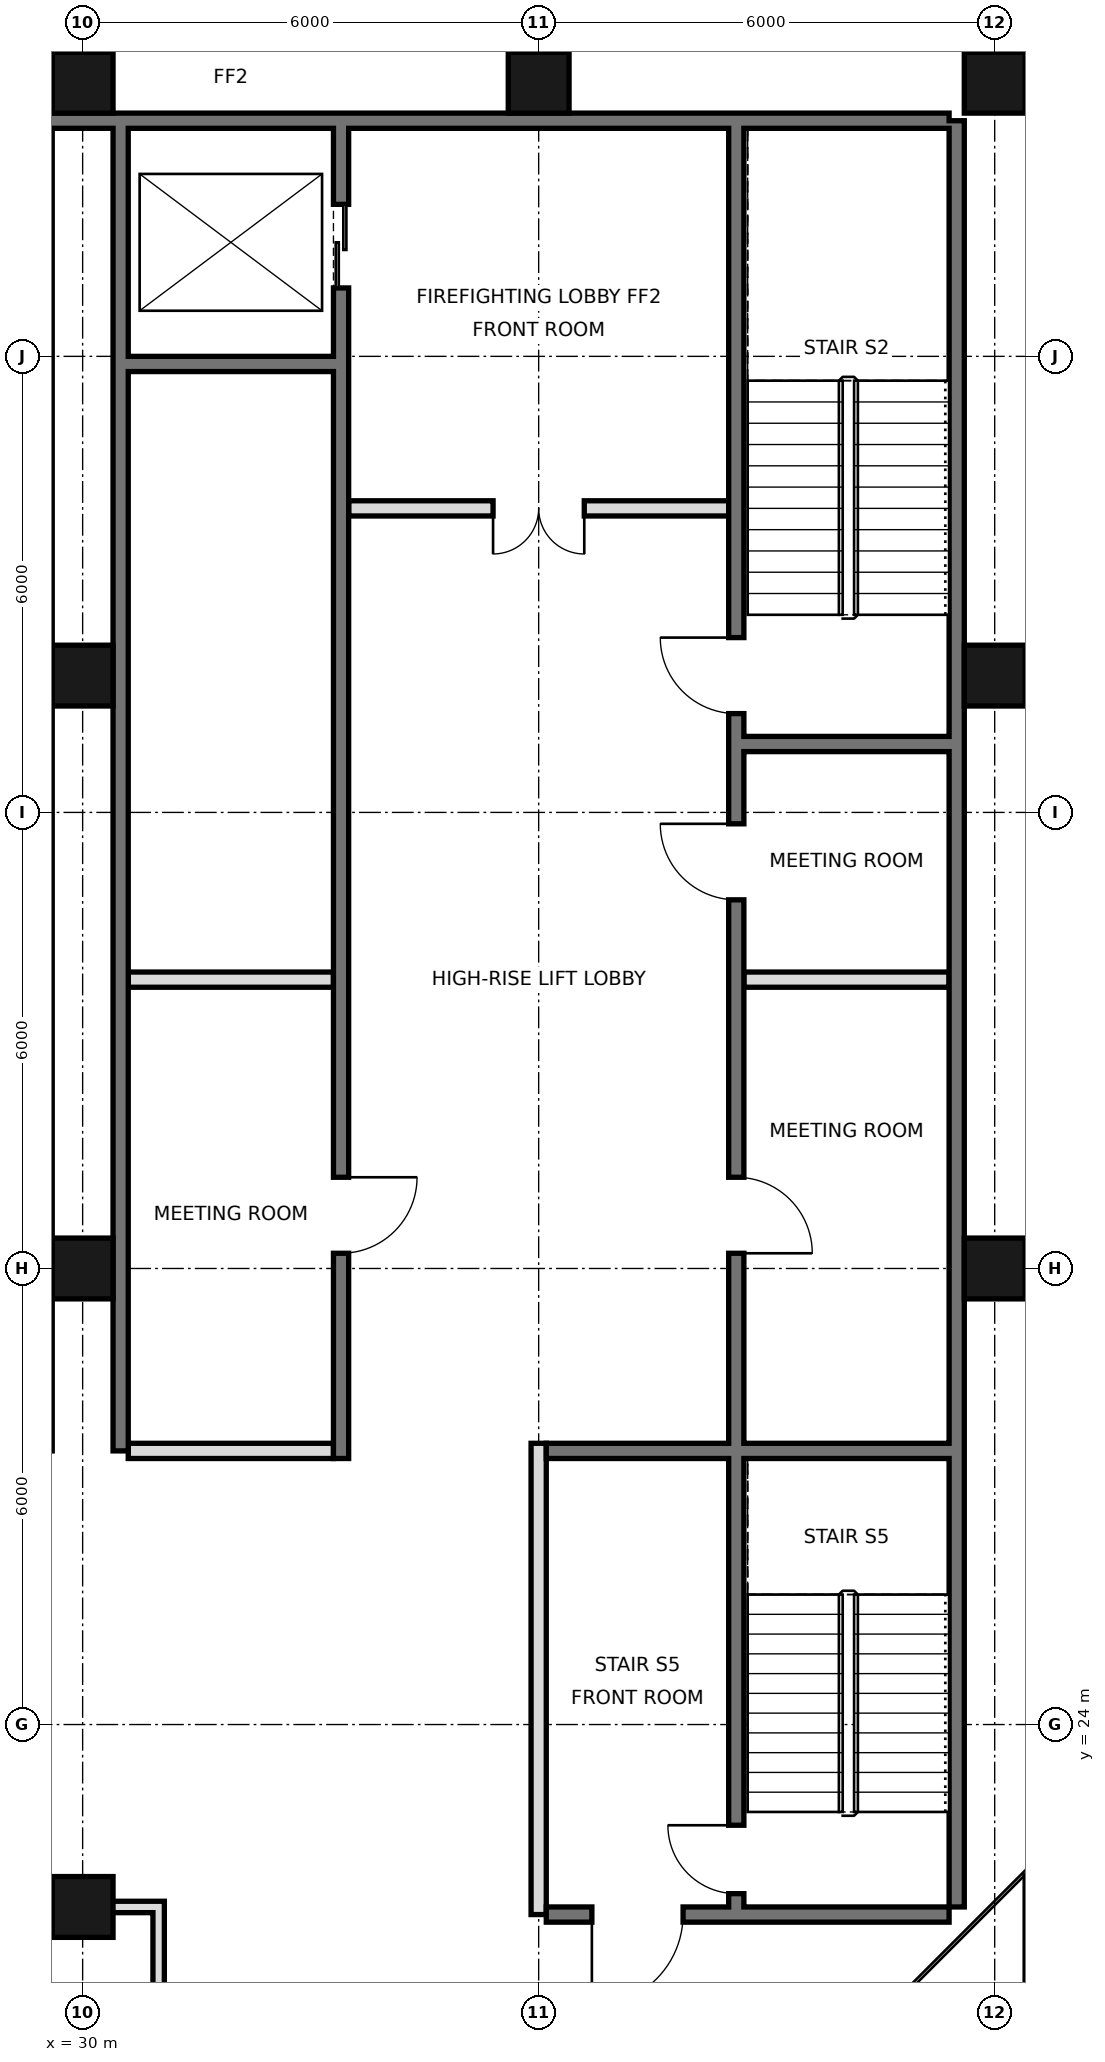
"""IFC4 building model, lengths in metres.
Left out: names, types, materials, properties, quantities, classifications, styles, units other than length and angle.
Written with IfcOpenShell. Run it as: python <this file> out.ifc"""

import sys

from ifc_helpers import new_model, si_unit, direction, frame, frame_2d, origin, origin_2d, place, context, subcontext, project, spatial, rectangle, hollow_rectangle, extrude, element, fill, save


model = new_model("IFC4")
c1 = context("Model", 3, precision=1e-05, world=origin(), true_north=direction((0.0, 1.0)))
c2 = subcontext(c1, "Body", "Model", "MODEL_VIEW")
j1 = project(units=[si_unit("LENGTHUNIT", "METRE"), si_unit("PLANEANGLEUNIT", "RADIAN")], contexts=[c1])
p1 = place(None, origin())
s1 = spatial("IfcSite", under=j1, at=p1, CompositionType="ELEMENT")
p2 = place(p1, origin())
s2 = spatial("IfcBuilding", under=s1, at=p2, CompositionType="ELEMENT")
p3 = place(p2, frame((0.0, 0.0, 345.8)))
s3 = spatial("IfcBuildingStorey", under=s2, at=p3, CompositionType="ELEMENT", Elevation=345.8)
for number, where, z_axis, x_axis in (
    (1, (30.0, 21.6, 0.0), (0.0, 0.0, 1.0), (1.0, 0.0, 0.0)),
    (2, (30.0, 30.0, 0.0), (0.0, 0.0, 1.0), (1.0, 0.0, 0.0)),
    (3, (30.0, 37.8, 0.0), (0.0, 0.0, 1.0), (1.0, 0.0, 0.0)),
    (4, (30.0, 45.6, 0.0), (0.0, 0.0, 1.0), (1.0, 0.0, 0.0)),
    (5, (36.0, 45.6, 0.0), (0.0, 0.0, 1.0), (1.0, 0.0, 0.0)),
    (6, (42.0, 30.0, 0.0), (0.0, 0.0, 1.0), (1.0, 0.0, 0.0)),
    (7, (42.0, 37.8, 0.0), (0.0, 0.0, 1.0), (1.0, 0.0, 0.0)),
    (8, (42.0, 45.6, 0.0), (0.0, 0.0, 1.0), (1.0, 0.0, 0.0)),
):
    element("IfcColumn", number, at=place(p3, frame(where, z_axis=z_axis, x_axis=x_axis)), inside=s3, PredefinedType="COLUMN", context=c2, shape_type="SweptSolid", body=[
        extrude(hollow_rectangle(XDim=0.8, YDim=0.8, WallThickness=0.025, at=origin_2d()), origin(), (0.0, 0.0, 1.0), 4.0),
    ])
p4 = place(p3, frame((31.0, 17.525, 0.0), z_axis=(0.0, 0.0, 1.0), x_axis=(0.0, 1.0, 0.0)))
e9 = element("IfcWall", 9, at=p4, inside=s3, PredefinedType="PARTITIONING", context=c2, shape_type="SweptSolid", body=[
    extrude(rectangle(XDim=4.15, YDim=0.15, at=frame_2d((2.075, 0.0))), origin(), (0.0, 0.0, 1.0), 3.75),
])
p5 = place(p3, frame((27.075, 21.6, 0.0), z_axis=(0.0, 0.0, 1.0), x_axis=(1.0, 0.0, 0.0)))
e10 = element("IfcWall", 10, at=p5, inside=s3, PredefinedType="PARTITIONING", context=c2, shape_type="SweptSolid", body=[
    extrude(rectangle(XDim=3.85, YDim=0.15, at=frame_2d((1.925, 0.0))), origin(), (0.0, 0.0, 1.0), 3.75),
])
p6 = place(p5, frame((1.425, 0.0, 0.0)))
e11 = element("IfcOpeningElement", 11, at=p6, cuts=e10, PredefinedType="OPENING", context=c2, shape_type="SweptSolid", body=[
    extrude(rectangle(XDim=1.0, YDim=2.4, at=frame_2d((0.5, 1.2))), frame((0.0, 0.085, 0.0), z_axis=(0.0, -1.0, 0.0), x_axis=(1.0, 0.0, 0.0)), (0.0, 0.0, 1.0), 0.17),
])
p7 = place(p3, frame((41.5, 21.6, 0.0), z_axis=(0.0, 0.0, 1.0), x_axis=(0.0, 1.0, 0.0)))
e12 = element("IfcWall", 12, at=p7, inside=s3, PredefinedType="SOLIDWALL", context=c2, shape_type="SweptSolid", body=[
    extrude(rectangle(XDim=23.5, YDim=0.2, at=frame_2d((11.75, 0.0))), origin(), (0.0, 0.0, 1.0), 3.75),
])
p8 = place(p3, frame((6.6, 45.1, 0.0), z_axis=(0.0, 0.0, 1.0), x_axis=(1.0, 0.0, 0.0)))
e13 = element("IfcWall", 13, at=p8, inside=s3, PredefinedType="SOLIDWALL", context=c2, shape_type="SweptSolid", body=[
    extrude(rectangle(XDim=34.8, YDim=0.2, at=frame_2d((17.4, 0.0))), origin(), (0.0, 0.0, 1.0), 3.75),
])
p9 = place(p3, frame((30.5, 27.6, 0.0), z_axis=(0.0, 0.0, 1.0), x_axis=(0.0, 1.0, 0.0)))
e14 = element("IfcWall", 14, at=p9, inside=s3, PredefinedType="SOLIDWALL", context=c2, shape_type="SweptSolid", body=[
    extrude(rectangle(XDim=17.5, YDim=0.2, at=frame_2d((8.75, 0.0))), origin(), (0.0, 0.0, 1.0), 3.75),
])
p10 = place(p3, frame((33.4, 27.5, 0.0), z_axis=(0.0, 0.0, 1.0), x_axis=(0.0, 1.0, 0.0)))
e15 = element("IfcWall", 15, at=p10, inside=s3, PredefinedType="SOLIDWALL", context=c2, shape_type="SweptSolid", body=[
    extrude(rectangle(XDim=17.5, YDim=0.2, at=frame_2d((8.75, 0.0))), origin(), (0.0, 0.0, 1.0), 3.75),
])
p11 = place(p10, frame((15.4, 0.0, 0.0)))
e16 = element("IfcOpeningElement", 16, at=p11, cuts=e15, PredefinedType="OPENING", context=c2, shape_type="SweptSolid", body=[
    extrude(rectangle(XDim=1.1, YDim=2.1, at=frame_2d((0.55, 1.05))), frame((0.0, 0.11, 0.0), z_axis=(0.0, -1.0, 0.0), x_axis=(1.0, 0.0, 0.0)), (0.0, 0.0, 1.0), 0.22),
])
p12 = place(p10, frame((2.7, 0.0, 0.0)))
e17 = element("IfcOpeningElement", 17, at=p12, cuts=e15, PredefinedType="OPENING", context=c2, shape_type="SweptSolid", body=[
    extrude(rectangle(XDim=1.0, YDim=2.1, at=frame_2d((0.5, 1.05))), frame((0.0, 0.11, 0.0), z_axis=(0.0, -1.0, 0.0), x_axis=(1.0, 0.0, 0.0)), (0.0, 0.0, 1.0), 0.22),
])
p13 = place(p3, frame((36.0, 21.5, 0.0), z_axis=(0.0, 0.0, 1.0), x_axis=(0.0, 1.0, 0.0)))
e18 = element("IfcWall", 18, at=p13, inside=s3, PredefinedType="PARTITIONING", context=c2, shape_type="SweptSolid", body=[
    extrude(rectangle(XDim=6.2, YDim=0.2, at=frame_2d((3.1, 0.0))), origin(), (0.0, 0.0, 1.0), 3.75),
])
p14 = place(p3, frame((38.6, 21.5, 0.0), z_axis=(0.0, 0.0, 1.0), x_axis=(0.0, 1.0, 0.0)))
e19 = element("IfcWall", 19, at=p14, inside=s3, PredefinedType="SOLIDWALL", context=c2, shape_type="SweptSolid", body=[
    extrude(rectangle(XDim=23.5, YDim=0.2, at=frame_2d((11.75, 0.0))), origin(), (0.0, 0.0, 1.0), 3.75),
])
p15 = place(p14, frame((8.7, 0.0, 0.0)))
e20 = element("IfcOpeningElement", 20, at=p15, cuts=e19, PredefinedType="OPENING", context=c2, shape_type="SweptSolid", body=[
    extrude(rectangle(XDim=1.0, YDim=2.1, at=frame_2d((0.5, 1.05))), frame((0.0, 0.11, 0.0), z_axis=(0.0, -1.0, 0.0), x_axis=(1.0, 0.0, 0.0)), (0.0, 0.0, 1.0), 0.22),
])
p16 = place(p14, frame((13.35, 0.0, 0.0)))
e21 = element("IfcOpeningElement", 21, at=p16, cuts=e19, PredefinedType="OPENING", context=c2, shape_type="SweptSolid", body=[
    extrude(rectangle(XDim=1.0, YDim=2.1, at=frame_2d((0.5, 1.05))), frame((0.0, 0.11, 0.0), z_axis=(0.0, -1.0, 0.0), x_axis=(1.0, 0.0, 0.0)), (0.0, 0.0, 1.0), 0.22),
])
p17 = place(p14, frame((15.8, 0.0, 0.0)))
e22 = element("IfcOpeningElement", 22, at=p17, cuts=e19, PredefinedType="OPENING", context=c2, shape_type="SweptSolid", body=[
    extrude(rectangle(XDim=1.0, YDim=2.1, at=frame_2d((0.5, 1.05))), frame((0.0, 0.11, 0.0), z_axis=(0.0, -1.0, 0.0), x_axis=(1.0, 0.0, 0.0)), (0.0, 0.0, 1.0), 0.22),
])
p18 = place(p14, frame((0.275, 0.0, 0.0)))
e23 = element("IfcOpeningElement", 23, at=p18, cuts=e19, PredefinedType="OPENING", context=c2, shape_type="SweptSolid", body=[
    extrude(rectangle(XDim=0.9, YDim=2.1, at=frame_2d((0.45, 1.05))), frame((0.0, 0.11, 0.0), z_axis=(0.0, -1.0, 0.0), x_axis=(1.0, 0.0, 0.0)), (0.0, 0.0, 1.0), 0.22),
])
p19 = place(p3, frame((36.1, 21.5, 0.0), z_axis=(0.0, 0.0, 1.0), x_axis=(1.0, 0.0, 0.0)))
e24 = element("IfcWall", 24, at=p19, inside=s3, PredefinedType="SOLIDWALL", context=c2, shape_type="SweptSolid", body=[
    extrude(rectangle(XDim=5.3, YDim=0.2, at=frame_2d((2.65, 0.0))), origin(), (0.0, 0.0, 1.0), 3.75),
])
p20 = place(p19, frame((0.6, 0.0, 0.0)))
e25 = element("IfcOpeningElement", 25, at=p20, cuts=e24, PredefinedType="OPENING", context=c2, shape_type="SweptSolid", body=[
    extrude(rectangle(XDim=1.2, YDim=2.1, at=frame_2d((0.6, 1.05))), frame((0.0, 0.11, 0.0), z_axis=(0.0, -1.0, 0.0), x_axis=(1.0, 0.0, 0.0)), (0.0, 0.0, 1.0), 0.22),
])
p21 = place(p3, frame((30.6, 27.6, 0.0), z_axis=(0.0, 0.0, 1.0), x_axis=(1.0, 0.0, 0.0)))
e26 = element("IfcWall", 26, at=p21, inside=s3, PredefinedType="PARTITIONING", context=c2, shape_type="SweptSolid", body=[
    extrude(rectangle(XDim=2.7, YDim=0.2, at=frame_2d((1.35, 0.0))), origin(), (0.0, 0.0, 1.0), 3.75),
])
p22 = place(p3, frame((36.1, 27.6, 0.0), z_axis=(0.0, 0.0, 1.0), x_axis=(1.0, 0.0, 0.0)))
e27 = element("IfcWall", 27, at=p22, inside=s3, PredefinedType="SOLIDWALL", context=c2, shape_type="SweptSolid", body=[
    extrude(rectangle(XDim=5.3, YDim=0.2, at=frame_2d((2.65, 0.0))), origin(), (0.0, 0.0, 1.0), 3.75),
])
for number, where, z_axis, x_axis in (
    (28, (30.6, 33.8, 0.0), (0.0, 0.0, 1.0), (1.0, 0.0, 0.0)),
    (29, (38.7, 33.8, 0.0), (0.0, 0.0, 1.0), (1.0, 0.0, 0.0)),
):
    element("IfcWall", number, at=place(p3, frame(where, z_axis=z_axis, x_axis=x_axis)), inside=s3, PredefinedType="PARTITIONING", context=c2, shape_type="SweptSolid", body=[
        extrude(rectangle(XDim=2.7, YDim=0.2, at=frame_2d((1.35, 0.0))), origin(), (0.0, 0.0, 1.0), 3.75),
    ])
p23 = place(p3, frame((38.7, 36.9, 0.0), z_axis=(0.0, 0.0, 1.0), x_axis=(1.0, 0.0, 0.0)))
e30 = element("IfcWall", 30, at=p23, inside=s3, PredefinedType="SOLIDWALL", context=c2, shape_type="SweptSolid", body=[
    extrude(rectangle(XDim=2.7, YDim=0.2, at=frame_2d((1.35, 0.0))), origin(), (0.0, 0.0, 1.0), 3.75),
])
p24 = place(p3, frame((33.5, 40.0, 0.0), z_axis=(0.0, 0.0, 1.0), x_axis=(1.0, 0.0, 0.0)))
e31 = element("IfcWall", 31, at=p24, inside=s3, PredefinedType="PARTITIONING", context=c2, shape_type="SweptSolid", body=[
    extrude(rectangle(XDim=5.0, YDim=0.2, at=frame_2d((2.5, 0.0))), origin(), (0.0, 0.0, 1.0), 3.75),
])
p25 = place(p24, frame((1.9, 0.0, 0.0)))
e32 = element("IfcOpeningElement", 32, at=p25, cuts=e31, PredefinedType="OPENING", context=c2, shape_type="SweptSolid", body=[
    extrude(rectangle(XDim=1.2, YDim=2.1, at=frame_2d((0.6, 1.05))), frame((0.0, 0.11, 0.0), z_axis=(0.0, -1.0, 0.0), x_axis=(1.0, 0.0, 0.0)), (0.0, 0.0, 1.0), 0.22),
])
p26 = place(p3, frame((30.6, 41.9, 0.0), z_axis=(0.0, 0.0, 1.0), x_axis=(1.0, 0.0, 0.0)))
e33 = element("IfcWall", 33, at=p26, inside=s3, PredefinedType="SOLIDWALL", context=c2, shape_type="SweptSolid", body=[
    extrude(rectangle(XDim=2.7, YDim=0.2, at=frame_2d((1.35, 0.0))), origin(), (0.0, 0.0, 1.0), 3.75),
])
p27 = place(p20, frame((1.2, 0.0, 0.0), z_axis=(0.0, 0.0, 1.0), x_axis=(-1.0, 0.0, 0.0)))
e34 = element("IfcDoor", 34, at=p27, inside=s3, OperationType="SINGLE_SWING_RIGHT", PredefinedType="DOOR", context=c2, shape_type="SweptSolid", body=[
    extrude(rectangle(XDim=1.2, YDim=2.1, at=frame_2d((0.6, 1.05))), frame((0.0, 0.025, 0.0), z_axis=(0.0, -1.0, 0.0), x_axis=(1.0, 0.0, 0.0)), (0.0, 0.0, 1.0), 0.05),
])
fill(e25, e34)
p28 = place(p25, frame((1.2, 0.0, 0.0), z_axis=(0.0, 0.0, 1.0), x_axis=(-1.0, 0.0, 0.0)))
e35 = element("IfcDoor", 35, at=p28, inside=s3, OperationType="DOUBLE_DOOR_SINGLE_SWING", PredefinedType="DOOR", context=c2, shape_type="SweptSolid", body=[
    extrude(rectangle(XDim=1.2, YDim=2.1, at=frame_2d((0.6, 1.05))), frame((0.0, 0.025, 0.0), z_axis=(0.0, -1.0, 0.0), x_axis=(1.0, 0.0, 0.0)), (0.0, 0.0, 1.0), 0.05),
])
fill(e32, e35)
p29 = place(p11, origin())
e36 = element("IfcDoor", 36, at=p29, inside=s3, OperationType="DOUBLE_DOOR_SLIDING", PredefinedType="DOOR", context=c2, shape_type="SweptSolid", body=[
    extrude(rectangle(XDim=1.1, YDim=2.1, at=frame_2d((0.55, 1.05))), frame((0.0, 0.025, 0.0), z_axis=(0.0, -1.0, 0.0), x_axis=(1.0, 0.0, 0.0)), (0.0, 0.0, 1.0), 0.05),
])
fill(e16, e36)
p30 = place(p15, frame((1.0, 0.0, 0.0), z_axis=(0.0, 0.0, 1.0), x_axis=(-1.0, 0.0, 0.0)))
e37 = element("IfcDoor", 37, at=p30, inside=s3, OperationType="SINGLE_SWING_RIGHT", PredefinedType="DOOR", context=c2, shape_type="SweptSolid", body=[
    extrude(rectangle(XDim=1.0, YDim=2.1, at=frame_2d((0.5, 1.05))), frame((0.0, 0.025, 0.0), z_axis=(0.0, -1.0, 0.0), x_axis=(1.0, 0.0, 0.0)), (0.0, 0.0, 1.0), 0.05),
])
fill(e20, e37)
p31 = place(p16, frame((1.0, 0.0, 0.0), z_axis=(0.0, 0.0, 1.0), x_axis=(-1.0, 0.0, 0.0)))
e38 = element("IfcDoor", 38, at=p31, inside=s3, OperationType="SINGLE_SWING_LEFT", PredefinedType="DOOR", context=c2, shape_type="SweptSolid", body=[
    extrude(rectangle(XDim=1.0, YDim=2.1, at=frame_2d((0.5, 1.05))), frame((0.0, 0.025, 0.0), z_axis=(0.0, -1.0, 0.0), x_axis=(1.0, 0.0, 0.0)), (0.0, 0.0, 1.0), 0.05),
])
fill(e21, e38)
p32 = place(p12, origin())
e39 = element("IfcDoor", 39, at=p32, inside=s3, OperationType="SINGLE_SWING_RIGHT", PredefinedType="DOOR", context=c2, shape_type="SweptSolid", body=[
    extrude(rectangle(XDim=1.0, YDim=2.1, at=frame_2d((0.5, 1.05))), frame((0.0, 0.025, 0.0), z_axis=(0.0, -1.0, 0.0), x_axis=(1.0, 0.0, 0.0)), (0.0, 0.0, 1.0), 0.05),
])
fill(e17, e39)
p33 = place(p17, frame((1.0, 0.0, 0.0), z_axis=(0.0, 0.0, 1.0), x_axis=(-1.0, 0.0, 0.0)))
e40 = element("IfcDoor", 40, at=p33, inside=s3, OperationType="SINGLE_SWING_LEFT", PredefinedType="DOOR", context=c2, shape_type="SweptSolid", body=[
    extrude(rectangle(XDim=1.0, YDim=2.1, at=frame_2d((0.5, 1.05))), frame((0.0, 0.025, 0.0), z_axis=(0.0, -1.0, 0.0), x_axis=(1.0, 0.0, 0.0)), (0.0, 0.0, 1.0), 0.05),
])
fill(e22, e40)
p34 = place(p18, frame((0.9, 0.0, 0.0), z_axis=(0.0, 0.0, 1.0), x_axis=(-1.0, 0.0, 0.0)))
e41 = element("IfcDoor", 41, at=p34, inside=s3, OperationType="SINGLE_SWING_LEFT", PredefinedType="DOOR", context=c2, shape_type="SweptSolid", body=[
    extrude(rectangle(XDim=0.9, YDim=2.1, at=frame_2d((0.45, 1.05))), frame((0.0, 0.025, 0.0), z_axis=(0.0, -1.0, 0.0), x_axis=(1.0, 0.0, 0.0)), (0.0, 0.0, 1.0), 0.05),
])
fill(e23, e41)
save(model, sys.argv[1])
